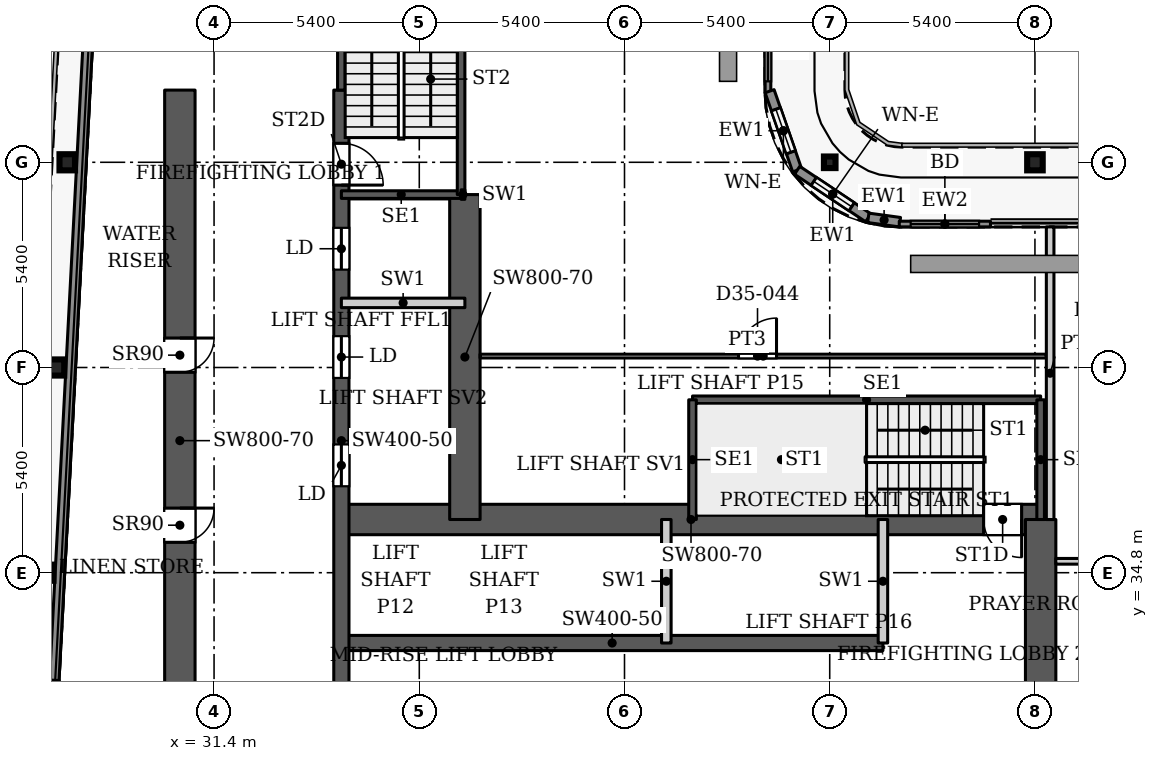
"""IFC4 building model, lengths in metres.
Left out: names, types, materials, properties, quantities, classifications, styles, units other than length and angle.
Written with IfcOpenShell. Run it as: python <this file> out.ifc"""

import sys

from ifc_helpers import new_model, si_unit, direction, frame, frame_2d, origin, origin_2d, place, context, subcontext, project, spatial, rectangle, hollow_rectangle, i_section, extrude, source, transform, mapped, element, fill, save


model = new_model("IFC4")
c1 = context("Model", 3, precision=1e-05, world=origin(), true_north=direction((0.0, 1.0)))
c2 = subcontext(c1, "Body", "Model", "MODEL_VIEW")
j1 = project(units=[si_unit("LENGTHUNIT", "METRE"), si_unit("PLANEANGLEUNIT", "RADIAN")], contexts=[c1])
p1 = place(None, origin())
s1 = spatial("IfcSite", under=j1, at=p1, CompositionType="ELEMENT")
p2 = place(p1, origin())
s2 = spatial("IfcBuilding", under=s1, at=p2, CompositionType="ELEMENT")
p3 = place(p2, frame((0.0, 0.0, 152.6)))
s3 = spatial("IfcBuildingStorey", under=s2, at=p3, CompositionType="ELEMENT", Elevation=152.6)
for number, where, z_axis, x_axis in (
    (1, (26.969, 34.8, 0.0), (0.0, 0.0, 1.0), (1.0, 0.0, 0.0)),
    (2, (27.253, 40.2, 0.0), (0.0, 0.0, 1.0), (1.0, 0.0, 0.0)),
    (3, (27.537, 45.6, 0.0), (0.0, 0.0, 1.0), (1.0, 0.0, 0.0)),
    (4, (53.0, 45.6, 0.0), (0.0, 0.0, 1.0), (1.0, 0.0, 0.0)),
):
    element("IfcColumn", number, at=place(p3, frame(where, z_axis=z_axis, x_axis=x_axis)), inside=s3, PredefinedType="COLUMN", context=c2, shape_type="SweptSolid", body=[
        extrude(i_section(OverallWidth=0.409, OverallDepth=0.425, WebThickness=0.033, FlangeThickness=0.052, FilletRadius=0.013, at=origin_2d()), origin(), (0.0, 0.0, 1.0), 3.9),
    ])
p4 = place(p3, frame((47.6, 45.6, 0.0), z_axis=(0.0, 0.0, 1.0), x_axis=(1.0, 0.0, 0.0)))
e5 = element("IfcColumn", 5, at=p4, inside=s3, PredefinedType="COLUMN", context=c2, shape_type="SweptSolid", body=[
    extrude(hollow_rectangle(XDim=0.305, YDim=0.305, WallThickness=0.016, InnerFilletRadius=0.016, OuterFilletRadius=0.032, at=origin_2d()), origin(), (0.0, 0.0, 1.0), 3.9),
])
p5 = place(p3, frame((34.75, 32.95, 0.0), z_axis=(0.0, 0.0, 1.0), x_axis=(1.0, 0.0, 0.0)))
e6 = element("IfcWall", 6, at=p5, inside=s3, PredefinedType="SHEAR", context=c2, shape_type="SweptSolid", body=[
    extrude(rectangle(XDim=14.25, YDim=0.4, at=frame_2d((7.125, 0.0))), origin(), (0.0, 0.0, 1.0), 3.9),
])
p6 = place(p3, frame((34.75, 36.2, 0.0), z_axis=(0.0, 0.0, 1.0), x_axis=(1.0, 0.0, 0.0)))
e7 = element("IfcWall", 7, at=p6, inside=s3, PredefinedType="SHEAR", context=c2, shape_type="SweptSolid", body=[
    extrude(rectangle(XDim=18.4, YDim=0.8, at=frame_2d((9.2, 0.0))), origin(), (0.0, 0.0, 1.0), 3.9),
])
p7 = place(p6, frame((16.9, 0.0, 0.0)))
e8 = element("IfcOpeningElement", 8, at=p7, cuts=e7, PredefinedType="OPENING", context=c2, shape_type="SweptSolid", body=[
    extrude(rectangle(XDim=1.0, YDim=2.2, at=frame_2d((0.5, 1.1))), frame((0.0, 0.41, 0.0), z_axis=(0.0, -1.0, 0.0), x_axis=(1.0, 0.0, 0.0)), (0.0, 0.0, 1.0), 0.82),
])
p8 = place(p3, frame((34.75, 29.05, 0.0), z_axis=(0.0, 0.0, 1.0), x_axis=(0.0, 1.0, 0.0)))
e9 = element("IfcWall", 9, at=p8, inside=s3, PredefinedType="SHEAR", context=c2, shape_type="SweptSolid", body=[
    extrude(rectangle(XDim=18.45, YDim=0.4, at=frame_2d((9.225, 0.0))), origin(), (0.0, 0.0, 1.0), 3.9),
])
p9 = place(p8, frame((8.025, 0.0, 0.0)))
e10 = element("IfcOpeningElement", 10, at=p9, cuts=e9, PredefinedType="OPENING", context=c2, shape_type="SweptSolid", body=[
    extrude(rectangle(XDim=1.1, YDim=2.2, at=frame_2d((0.55, 1.1))), frame((0.0, 0.21, 0.0), z_axis=(0.0, -1.0, 0.0), x_axis=(1.0, 0.0, 0.0)), (0.0, 0.0, 1.0), 0.42),
])
p10 = place(p8, frame((10.875, 0.0, 0.0)))
e11 = element("IfcOpeningElement", 11, at=p10, cuts=e9, PredefinedType="OPENING", context=c2, shape_type="SweptSolid", body=[
    extrude(rectangle(XDim=1.1, YDim=2.2, at=frame_2d((0.55, 1.1))), frame((0.0, 0.21, 0.0), z_axis=(0.0, -1.0, 0.0), x_axis=(1.0, 0.0, 0.0)), (0.0, 0.0, 1.0), 0.42),
])
p11 = place(p8, frame((13.725, 0.0, 0.0)))
e12 = element("IfcOpeningElement", 12, at=p11, cuts=e9, PredefinedType="OPENING", context=c2, shape_type="SweptSolid", body=[
    extrude(rectangle(XDim=1.1, YDim=2.2, at=frame_2d((0.55, 1.1))), frame((0.0, 0.21, 0.0), z_axis=(0.0, -1.0, 0.0), x_axis=(1.0, 0.0, 0.0)), (0.0, 0.0, 1.0), 0.42),
])
p12 = place(p8, frame((15.95, 0.0, 0.0)))
e13 = element("IfcOpeningElement", 13, at=p12, cuts=e9, PredefinedType="OPENING", context=c2, shape_type="SweptSolid", body=[
    extrude(rectangle(XDim=1.1, YDim=2.2, at=frame_2d((0.55, 1.1))), frame((0.0, 0.21, 0.0), z_axis=(0.0, -1.0, 0.0), x_axis=(1.0, 0.0, 0.0)), (0.0, 0.0, 1.0), 0.42),
])
p13 = place(p3, frame((38.0, 36.2, 0.0), z_axis=(0.0, 0.0, 1.0), x_axis=(0.0, 1.0, 0.0)))
e14 = element("IfcWall", 14, at=p13, inside=s3, PredefinedType="SHEAR", context=c2, shape_type="SweptSolid", body=[
    extrude(rectangle(XDim=8.55, YDim=0.8, at=frame_2d((4.275, 0.0))), origin(), (0.0, 0.0, 1.0), 3.9),
])
p14 = place(p3, frame((30.5, 29.05, 0.0), z_axis=(0.0, 0.0, 1.0), x_axis=(0.0, 1.0, 0.0)))
e15 = element("IfcWall", 15, at=p14, inside=s3, PredefinedType="SHEAR", context=c2, shape_type="SweptSolid", body=[
    extrude(rectangle(XDim=18.45, YDim=0.8, at=frame_2d((9.225, 0.0))), origin(), (0.0, 0.0, 1.0), 3.9),
])
p15 = place(p14, frame((6.55, 0.0, 0.0)))
e16 = element("IfcOpeningElement", 16, at=p15, cuts=e15, PredefinedType="OPENING", context=c2, shape_type="SweptSolid", body=[
    extrude(rectangle(XDim=0.9, YDim=2.2, at=frame_2d((0.45, 1.1))), frame((0.0, 0.41, 0.0), z_axis=(0.0, -1.0, 0.0), x_axis=(1.0, 0.0, 0.0)), (0.0, 0.0, 1.0), 0.82),
])
p16 = place(p14, frame((11.025, 0.0, 0.0)))
e17 = element("IfcOpeningElement", 17, at=p16, cuts=e15, PredefinedType="OPENING", context=c2, shape_type="SweptSolid", body=[
    extrude(rectangle(XDim=0.9, YDim=2.2, at=frame_2d((0.45, 1.1))), frame((0.0, 0.41, 0.0), z_axis=(0.0, -1.0, 0.0), x_axis=(1.0, 0.0, 0.0)), (0.0, 0.0, 1.0), 0.82),
])
p17 = place(p3, frame((53.15, 25.8, 0.0), z_axis=(0.0, 0.0, 1.0), x_axis=(0.0, 1.0, 0.0)))
e18 = element("IfcWall", 18, at=p17, inside=s3, PredefinedType="SHEAR", context=c2, shape_type="SweptSolid", body=[
    extrude(rectangle(XDim=10.4, YDim=0.8, at=frame_2d((5.2, 0.0))), origin(), (0.0, 0.0, 1.0), 3.9),
])
p18 = place(p3, frame((27.344, 30.055, 0.0), z_axis=(0.0, 0.0, 1.0), x_axis=(-0.077571675317, 0.99698677784, 0.0)))
e19 = element("IfcWall", 19, at=p18, inside=s3, PredefinedType="SOLIDWALL", context=c2, shape_type="SweptSolid", body=[
    extrude(rectangle(XDim=1.92, YDim=0.25, at=frame_2d((0.96, 0.0))), origin(), (0.0, 0.0, 1.0), 3.75),
])
p19 = place(p3, frame((27.195, 31.969, 0.0), z_axis=(0.0, 0.0, 1.0), x_axis=(0.052554995867, 0.998618031286, 0.0)))
e20 = element("IfcWall", 20, at=p19, inside=s3, PredefinedType="SOLIDWALL", context=c2, shape_type="SweptSolid", body=[
    extrude(rectangle(XDim=66.787, YDim=0.25, at=frame_2d((33.394, 0.0))), origin(), (0.0, 0.0, 1.0), 3.75),
])
p20 = place(p3, frame((45.975, 49.83, 0.0), z_axis=(0.0, 0.0, 1.0), x_axis=(0.0, -1.0, 0.0)))
e21 = element("IfcWall", 21, at=p20, inside=s3, PredefinedType="SOLIDWALL", context=c2, shape_type="SweptSolid", body=[
    extrude(rectangle(XDim=2.4, YDim=0.15, at=frame_2d((1.2, 0.0))), origin(), (0.0, 0.0, 1.0), 3.75),
])
p21 = place(p20, frame((0.3, 0.0, 0.0)))
e22 = element("IfcOpeningElement", 22, at=p21, cuts=e21, PredefinedType="OPENING", context=c2, shape_type="SweptSolid", body=[
    extrude(rectangle(XDim=1.8, YDim=2.4, at=frame_2d((0.9, 1.2))), frame((0.0, 0.085, 0.0), z_axis=(0.0, -1.0, 0.0), x_axis=(1.0, 0.0, 0.0)), (0.0, 0.0, 1.0), 0.17),
])
p22 = place(p3, frame((46.018, 47.471, 0.0), z_axis=(0.0, 0.0, 1.0), x_axis=(0.328791208903, -0.944402637093, 0.0)))
e23 = element("IfcWall", 23, at=p22, inside=s3, PredefinedType="SOLIDWALL", context=c2, shape_type="SweptSolid", body=[
    extrude(rectangle(XDim=2.205, YDim=0.25, at=frame_2d((1.102, 0.0))), origin(), (0.0, 0.0, 1.0), 3.75),
])
p23 = place(p22, frame((0.503, 0.0, 0.6)))
e24 = element("IfcOpeningElement", 24, at=p23, cuts=e23, PredefinedType="OPENING", context=c2, shape_type="SweptSolid", body=[
    extrude(rectangle(XDim=1.2, YDim=2.1, at=frame_2d((0.6, 1.05))), frame((0.0, 0.135, 0.0), z_axis=(0.0, -1.0, 0.0), x_axis=(1.0, 0.0, 0.0)), (0.0, 0.0, 1.0), 0.27),
])
p24 = place(p3, frame((46.743, 45.389, 0.0), z_axis=(0.0, 0.0, 1.0), x_axis=(0.831449265529, -0.555600682912, 0.0)))
e25 = element("IfcWall", 25, at=p24, inside=s3, PredefinedType="SOLIDWALL", context=c2, shape_type="SweptSolid", body=[
    extrude(rectangle(XDim=2.251, YDim=0.25, at=frame_2d((1.126, 0.0))), origin(), (0.0, 0.0, 1.0), 3.75),
])
p25 = place(p24, frame((0.525, 0.0, 0.6)))
e26 = element("IfcOpeningElement", 26, at=p25, cuts=e25, PredefinedType="OPENING", context=c2, shape_type="SweptSolid", body=[
    extrude(rectangle(XDim=1.2, YDim=2.1, at=frame_2d((0.6, 1.05))), frame((0.0, 0.135, 0.0), z_axis=(0.0, -1.0, 0.0), x_axis=(1.0, 0.0, 0.0)), (0.0, 0.0, 1.0), 0.27),
])
p26 = place(p3, frame((48.615, 44.138, 0.0), z_axis=(0.0, 0.0, 1.0), x_axis=(0.990741504246, -0.135761819977, 0.0)))
e27 = element("IfcWall", 27, at=p26, inside=s3, PredefinedType="SOLIDWALL", context=c2, shape_type="SweptSolid", body=[
    extrude(rectangle(XDim=0.84, YDim=0.25, at=frame_2d((0.42, 0.0))), origin(), (0.0, 0.0, 1.0), 3.75),
])
p27 = place(p3, frame((49.43, 43.975, 0.0), z_axis=(0.0, 0.0, 1.0), x_axis=(1.0, 0.0, 0.0)))
e28 = element("IfcWall", 28, at=p27, inside=s3, PredefinedType="SOLIDWALL", context=c2, shape_type="SweptSolid", body=[
    extrude(rectangle(XDim=2.4, YDim=0.15, at=frame_2d((1.2, 0.0))), origin(), (0.0, 0.0, 1.0), 3.75),
])
p28 = place(p27, frame((0.3, 0.0, 0.0)))
e29 = element("IfcOpeningElement", 29, at=p28, cuts=e28, PredefinedType="OPENING", context=c2, shape_type="SweptSolid", body=[
    extrude(rectangle(XDim=1.8, YDim=2.4, at=frame_2d((0.9, 1.2))), frame((0.0, 0.085, 0.0), z_axis=(0.0, -1.0, 0.0), x_axis=(1.0, 0.0, 0.0)), (0.0, 0.0, 1.0), 0.17),
])
p29 = place(p3, frame((43.99, 39.35, 0.0), z_axis=(0.0, 0.0, 1.0), x_axis=(1.0, 0.0, 0.0)))
e30 = element("IfcWall", 30, at=p29, inside=s3, PredefinedType="SHEAR", context=c2, shape_type="SweptSolid", body=[
    extrude(rectangle(XDim=9.16, YDim=0.2, at=frame_2d((4.58, 0.0))), origin(), (0.0, 0.0, 1.0), 3.9),
])
for number, where, z_axis, x_axis in (
    (31, (43.99, 36.2, 0.0), (0.0, 0.0, 1.0), (0.0, 1.0, 0.0)),
    (32, (53.15, 36.2, 0.0), (0.0, 0.0, 1.0), (0.0, 1.0, 0.0)),
):
    element("IfcWall", number, at=place(p3, frame(where, z_axis=z_axis, x_axis=x_axis)), inside=s3, PredefinedType="SHEAR", context=c2, shape_type="SweptSolid", body=[
        extrude(rectangle(XDim=3.15, YDim=0.2, at=frame_2d((1.575, 0.0))), origin(), (0.0, 0.0, 1.0), 3.9),
    ])
p30 = place(p3, frame((34.75, 44.75, 0.0), z_axis=(0.0, 0.0, 1.0), x_axis=(1.0, 0.0, 0.0)))
e33 = element("IfcWall", 33, at=p30, inside=s3, PredefinedType="SHEAR", context=c2, shape_type="SweptSolid", body=[
    extrude(rectangle(XDim=3.15, YDim=0.2, at=frame_2d((1.575, 0.0))), origin(), (0.0, 0.0, 1.0), 3.9),
])
p31 = place(p3, frame((34.75, 47.5, 0.0), z_axis=(0.0, 0.0, 1.0), x_axis=(0.0, 1.0, 0.0)))
e34 = element("IfcWall", 34, at=p31, inside=s3, PredefinedType="SHEAR", context=c2, shape_type="SweptSolid", body=[
    extrude(rectangle(XDim=6.41, YDim=0.2, at=frame_2d((3.205, 0.0))), origin(), (0.0, 0.0, 1.0), 3.9),
])
p32 = place(p3, frame((37.9, 44.75, 0.0), z_axis=(0.0, 0.0, 1.0), x_axis=(0.0, 1.0, 0.0)))
e35 = element("IfcWall", 35, at=p32, inside=s3, PredefinedType="SHEAR", context=c2, shape_type="SweptSolid", body=[
    extrude(rectangle(XDim=9.16, YDim=0.2, at=frame_2d((4.58, 0.0))), origin(), (0.0, 0.0, 1.0), 3.9),
])
for number, where, z_axis, x_axis in (
    (36, (43.3, 32.95, 0.0), (0.0, 0.0, 1.0), (0.0, 1.0, 0.0)),
    (37, (49.0, 32.95, 0.0), (0.0, 0.0, 1.0), (0.0, 1.0, 0.0)),
    (38, (34.75, 41.9, 0.0), (0.0, 0.0, 1.0), (1.0, 0.0, 0.0)),
):
    element("IfcWall", number, at=place(p3, frame(where, z_axis=z_axis, x_axis=x_axis)), inside=s3, PredefinedType="PARTITIONING", context=c2, shape_type="SweptSolid", body=[
        extrude(rectangle(XDim=3.25, YDim=0.25, at=frame_2d((1.625, 0.0))), origin(), (0.0, 0.0, 1.0), 3.9),
    ])
p33 = place(p3, frame((37.9, 44.75, 0.0), z_axis=(0.0, 0.0, 1.0), x_axis=(1.0, 0.0, 0.0)))
e39 = element("IfcWall", 39, at=p33, inside=s3, PredefinedType="PARTITIONING", context=c2, shape_type="SweptSolid", body=[
    extrude(rectangle(XDim=0.1, YDim=0.25, at=frame_2d((0.05, 0.0))), origin(), (0.0, 0.0, 1.0), 3.9),
])
p34 = place(p3, frame((38.399, 40.5, 0.0), z_axis=(0.0, 0.0, 1.0), x_axis=(1.0, 0.0, 0.0)))
e40 = element("IfcWall", 40, at=p34, inside=s3, PredefinedType="PARTITIONING", context=c2, shape_type="SweptSolid", body=[
    extrude(rectangle(XDim=14.901, YDim=0.1, at=frame_2d((7.451, 0.0))), origin(), (0.0, 0.0, 1.0), 3.6),
])
p35 = place(p34, frame((6.801, 0.0, 0.0)))
e41 = element("IfcOpeningElement", 41, at=p35, cuts=e40, PredefinedType="OPENING", context=c2, shape_type="SweptSolid", body=[
    extrude(rectangle(XDim=1.0, YDim=2.1, at=frame_2d((0.5, 1.05))), frame((0.0, 0.06, 0.0), z_axis=(0.0, -1.0, 0.0), x_axis=(1.0, 0.0, 0.0)), (0.0, 0.0, 1.0), 0.12),
])
p36 = place(p3, frame((53.4, 36.199, 0.0), z_axis=(0.0, 0.0, 1.0), x_axis=(0.0, 1.0, 0.0)))
e42 = element("IfcWall", 42, at=p36, inside=s3, PredefinedType="PARTITIONING", context=c2, shape_type="SweptSolid", body=[
    extrude(rectangle(XDim=7.701, YDim=0.2, at=frame_2d((3.851, 0.0))), origin(), (0.0, 0.0, 1.0), 3.6),
])
p37 = place(p3, frame((53.549, 35.1, 0.0), z_axis=(0.0, 0.0, 1.0), x_axis=(1.0, 0.0, 0.0)))
e43 = element("IfcWall", 43, at=p37, inside=s3, PredefinedType="PARTITIONING", context=c2, shape_type="SweptSolid", body=[
    extrude(rectangle(XDim=9.051, YDim=0.15, at=frame_2d((4.525, 0.0))), origin(), (0.0, 0.0, 1.0), 3.6),
])
p38 = place(p37, frame((6.751, 0.0, 0.0)))
e44 = element("IfcOpeningElement", 44, at=p38, cuts=e43, PredefinedType="OPENING", context=c2, shape_type="SweptSolid", body=[
    extrude(rectangle(XDim=0.9, YDim=2.1, at=frame_2d((0.45, 1.05))), frame((0.0, 0.085, 0.0), z_axis=(0.0, -1.0, 0.0), x_axis=(1.0, 0.0, 0.0)), (0.0, 0.0, 1.0), 0.17),
])
p39 = place(p37, frame((2.051, 0.0, 0.0)))
e45 = element("IfcOpeningElement", 45, at=p39, cuts=e43, PredefinedType="OPENING", context=c2, shape_type="SweptSolid", body=[
    extrude(rectangle(XDim=1.0, YDim=2.1, at=frame_2d((0.5, 1.05))), frame((0.0, 0.085, 0.0), z_axis=(0.0, -1.0, 0.0), x_axis=(1.0, 0.0, 0.0)), (0.0, 0.0, 1.0), 0.17),
])
m1 = source(origin(), c2, "Body", "SweptSolid", [
    extrude(rectangle(XDim=1.8, YDim=2.4, at=frame_2d((0.9, 1.2))), frame((0.0, 0.025, 0.0), z_axis=(0.0, -1.0, 0.0), x_axis=(1.0, 0.0, 0.0)), (0.0, 0.0, 1.0), 0.05),
])
p40 = place(p21, origin())
e46 = element("IfcDoor", 46, at=p40, inside=s3, OperationType="SLIDING_TO_LEFT", PredefinedType="DOOR", context=c2, shape_type="MappedRepresentation", body=[
    mapped(m1, transform((0.0, 0.0, 0.0), x_axis=(1.0, 0.0, 0.0), y_axis=(0.0, 1.0, 0.0), z_axis=(0.0, 0.0, 1.0), scale=1.0)),
])
fill(e22, e46)
m2 = source(origin(), c2, "Body", "SweptSolid", [
    extrude(rectangle(XDim=1.2, YDim=2.1, at=frame_2d((0.6, 1.05))), frame((0.0, 0.03, 0.0), z_axis=(0.0, -1.0, 0.0), x_axis=(1.0, 0.0, 0.0)), (0.0, 0.0, 1.0), 0.06),
])
p41 = place(p23, origin())
e47 = element("IfcWindow", 47, at=p41, inside=s3, PartitioningType="SINGLE_PANEL", PredefinedType="WINDOW", context=c2, shape_type="MappedRepresentation", body=[
    mapped(m2, transform((0.0, 0.0, 0.0), x_axis=(1.0, 0.0, 0.0), y_axis=(0.0, 1.0, 0.0), z_axis=(0.0, 0.0, 1.0), scale=1.0)),
])
fill(e24, e47)
p42 = place(p25, origin())
e48 = element("IfcWindow", 48, at=p42, inside=s3, PartitioningType="SINGLE_PANEL", PredefinedType="WINDOW", context=c2, shape_type="MappedRepresentation", body=[
    mapped(m2, transform((0.0, 0.0, 0.0), x_axis=(1.0, 0.0, 0.0), y_axis=(0.0, 1.0, 0.0), z_axis=(0.0, 0.0, 1.0), scale=1.0)),
])
fill(e26, e48)
p43 = place(p28, origin())
e49 = element("IfcDoor", 49, at=p43, inside=s3, OperationType="SLIDING_TO_LEFT", PredefinedType="DOOR", context=c2, shape_type="MappedRepresentation", body=[
    mapped(m1, transform((0.0, 0.0, 0.0), x_axis=(1.0, 0.0, 0.0), y_axis=(0.0, 1.0, 0.0), z_axis=(0.0, 0.0, 1.0), scale=1.0)),
])
fill(e29, e49)
m3 = source(origin(), c2, "Body", "SweptSolid", [
    extrude(rectangle(XDim=1.1, YDim=2.2, at=frame_2d((0.55, 1.1))), frame((0.0, 0.025, 0.0), z_axis=(0.0, -1.0, 0.0), x_axis=(1.0, 0.0, 0.0)), (0.0, 0.0, 1.0), 0.05),
])
p44 = place(p9, origin())
e50 = element("IfcDoor", 50, at=p44, inside=s3, OperationType="SLIDING_TO_LEFT", PredefinedType="DOOR", context=c2, shape_type="MappedRepresentation", body=[
    mapped(m3, transform((0.0, 0.0, 0.0), x_axis=(1.0, 0.0, 0.0), y_axis=(0.0, 1.0, 0.0), z_axis=(0.0, 0.0, 1.0), scale=1.0)),
])
fill(e10, e50)
p45 = place(p10, origin())
e51 = element("IfcDoor", 51, at=p45, inside=s3, OperationType="SLIDING_TO_LEFT", PredefinedType="DOOR", context=c2, shape_type="MappedRepresentation", body=[
    mapped(m3, transform((0.0, 0.0, 0.0), x_axis=(1.0, 0.0, 0.0), y_axis=(0.0, 1.0, 0.0), z_axis=(0.0, 0.0, 1.0), scale=1.0)),
])
fill(e11, e51)
p46 = place(p11, origin())
e52 = element("IfcDoor", 52, at=p46, inside=s3, OperationType="SLIDING_TO_LEFT", PredefinedType="DOOR", context=c2, shape_type="MappedRepresentation", body=[
    mapped(m3, transform((0.0, 0.0, 0.0), x_axis=(1.0, 0.0, 0.0), y_axis=(0.0, 1.0, 0.0), z_axis=(0.0, 0.0, 1.0), scale=1.0)),
])
fill(e12, e52)
m4 = source(origin(), c2, "Body", "SweptSolid", [
    extrude(rectangle(XDim=0.9, YDim=2.2, at=frame_2d((0.45, 1.1))), frame((0.0, 0.025, 0.0), z_axis=(0.0, -1.0, 0.0), x_axis=(1.0, 0.0, 0.0)), (0.0, 0.0, 1.0), 0.05),
])
p47 = place(p15, origin())
e53 = element("IfcDoor", 53, at=p47, inside=s3, OperationType="SINGLE_SWING_RIGHT", PredefinedType="DOOR", context=c2, shape_type="MappedRepresentation", body=[
    mapped(m4, transform((0.0, 0.0, 0.0), x_axis=(1.0, 0.0, 0.0), y_axis=(0.0, 1.0, 0.0), z_axis=(0.0, 0.0, 1.0), scale=1.0)),
])
fill(e16, e53)
p48 = place(p16, origin())
e54 = element("IfcDoor", 54, at=p48, inside=s3, OperationType="SINGLE_SWING_RIGHT", PredefinedType="DOOR", context=c2, shape_type="MappedRepresentation", body=[
    mapped(m4, transform((0.0, 0.0, 0.0), x_axis=(1.0, 0.0, 0.0), y_axis=(0.0, 1.0, 0.0), z_axis=(0.0, 0.0, 1.0), scale=1.0)),
])
fill(e17, e54)
m5 = source(origin(), c2, "Body", "SweptSolid", [
    extrude(rectangle(XDim=1.0, YDim=2.2, at=frame_2d((0.5, 1.1))), frame((0.0, 0.025, 0.0), z_axis=(0.0, -1.0, 0.0), x_axis=(1.0, 0.0, 0.0)), (0.0, 0.0, 1.0), 0.05),
])
p49 = place(p7, origin())
e55 = element("IfcDoor", 55, at=p49, inside=s3, OperationType="SINGLE_SWING_RIGHT", PredefinedType="DOOR", context=c2, shape_type="MappedRepresentation", body=[
    mapped(m5, transform((0.0, 0.0, 0.0), x_axis=(1.0, 0.0, 0.0), y_axis=(0.0, 1.0, 0.0), z_axis=(0.0, 0.0, 1.0), scale=1.0)),
])
fill(e8, e55)
m6 = source(origin(), c2, "Body", "SweptSolid", [
    extrude(rectangle(XDim=1.1, YDim=2.2, at=frame_2d((0.55, 1.1))), frame((0.0, 0.025, 0.0), z_axis=(0.0, -1.0, 0.0), x_axis=(1.0, 0.0, 0.0)), (0.0, 0.0, 1.0), 0.05),
])
p50 = place(p12, origin())
e56 = element("IfcDoor", 56, at=p50, inside=s3, OperationType="SINGLE_SWING_RIGHT", PredefinedType="DOOR", context=c2, shape_type="MappedRepresentation", body=[
    mapped(m6, transform((0.0, 0.0, 0.0), x_axis=(1.0, 0.0, 0.0), y_axis=(0.0, 1.0, 0.0), z_axis=(0.0, 0.0, 1.0), scale=1.0)),
])
fill(e13, e56)
m7 = source(origin(), c2, "Body", "SweptSolid", [
    extrude(rectangle(XDim=1.0, YDim=2.1, at=frame_2d((0.5, 1.05))), frame((0.0, 0.025, 0.0), z_axis=(0.0, -1.0, 0.0), x_axis=(1.0, 0.0, 0.0)), (0.0, 0.0, 1.0), 0.05),
])
p51 = place(p35, origin())
e57 = element("IfcDoor", 57, at=p51, inside=s3, OperationType="SINGLE_SWING_LEFT", PredefinedType="DOOR", context=c2, shape_type="MappedRepresentation", body=[
    mapped(m7, transform((0.0, 0.0, 0.0), x_axis=(1.0, 0.0, 0.0), y_axis=(0.0, 1.0, 0.0), z_axis=(0.0, 0.0, 1.0), scale=1.0)),
])
fill(e41, e57)
save(model, sys.argv[1])
